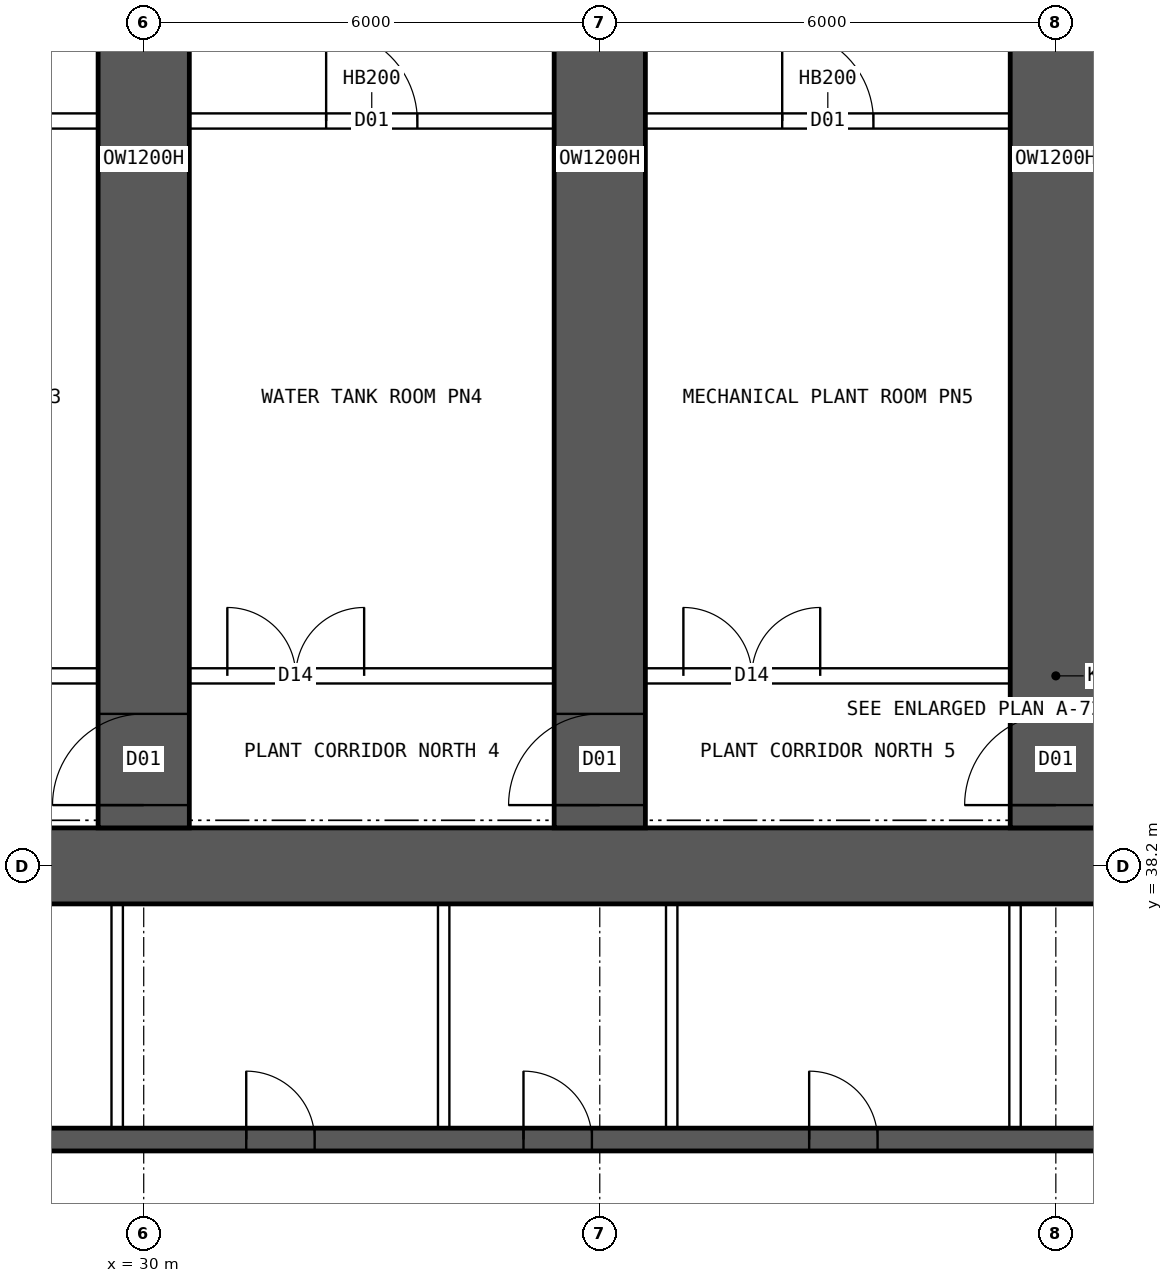
"""IFC4 building model, lengths in metres.
Left out: names, types, materials, properties, quantities, classifications, styles, units other than length and angle.
Written with IfcOpenShell. Run it as: python <this file> out.ifc"""

import sys

from ifc_helpers import new_model, si_unit, direction, frame, frame_2d, origin, place, context, subcontext, project, spatial, rectangle, extrude, element, fill, save


model = new_model("IFC4")
c1 = context("Model", 3, precision=1e-05, world=origin(), true_north=direction((0.0, 1.0)))
c2 = subcontext(c1, "Body", "Model", "MODEL_VIEW")
j1 = project(units=[si_unit("LENGTHUNIT", "METRE"), si_unit("PLANEANGLEUNIT", "RADIAN")], contexts=[c1])
p1 = place(None, origin())
s1 = spatial("IfcSite", under=j1, at=p1, CompositionType="ELEMENT")
p2 = place(p1, origin())
s2 = spatial("IfcBuilding", under=s1, at=p2, CompositionType="ELEMENT")
p3 = place(p2, frame((0.0, 0.0, 68.95)))
s3 = spatial("IfcBuildingStorey", under=s2, at=p3, CompositionType="ELEMENT", Elevation=68.95)
p4 = place(p3, frame((18.0, 38.2, 0.0), z_axis=(0.0, 0.0, 1.0), x_axis=(1.0, 0.0, 0.0)))
e1 = element("IfcWall", 1, at=p4, inside=s3, PredefinedType="SHEAR", context=c2, shape_type="SweptSolid", body=[
    extrude(rectangle(XDim=48.0, YDim=1.0, at=frame_2d((24.0, 0.0))), origin(), (0.0, 0.0, 1.0), 7.2),
])
p5 = place(p3, frame((18.5, 34.6, 0.0), z_axis=(0.0, 0.0, 1.0), x_axis=(1.0, 0.0, 0.0)))
e2 = element("IfcWall", 2, at=p5, inside=s3, PredefinedType="SHEAR", context=c2, shape_type="SweptSolid", body=[
    extrude(rectangle(XDim=47.0, YDim=0.3, at=frame_2d((23.5, 0.0))), origin(), (0.0, 0.0, 1.0), 7.2),
])
p6 = place(p5, frame((0.9, 0.0, 0.0)))
e3 = element("IfcOpeningElement", 3, at=p6, cuts=e2, PredefinedType="OPENING", context=c2, shape_type="SweptSolid", body=[
    extrude(rectangle(XDim=1.1, YDim=2.1, at=frame_2d((0.55, 1.05))), frame((0.0, 0.16, 0.0), z_axis=(0.0, -1.0, 0.0), x_axis=(1.0, 0.0, 0.0)), (0.0, 0.0, 1.0), 0.32),
])
p7 = place(p5, frame((45.0, 0.0, 0.0)))
e4 = element("IfcOpeningElement", 4, at=p7, cuts=e2, PredefinedType="OPENING", context=c2, shape_type="SweptSolid", body=[
    extrude(rectangle(XDim=1.1, YDim=2.1, at=frame_2d((0.55, 1.05))), frame((0.0, 0.16, 0.0), z_axis=(0.0, -1.0, 0.0), x_axis=(1.0, 0.0, 0.0)), (0.0, 0.0, 1.0), 0.32),
])
p8 = place(p5, frame((4.1, 0.0, 0.0)))
e5 = element("IfcOpeningElement", 5, at=p8, cuts=e2, PredefinedType="OPENING", context=c2, shape_type="SweptSolid", body=[
    extrude(rectangle(XDim=0.9, YDim=2.1, at=frame_2d((0.45, 1.05))), frame((0.0, 0.16, 0.0), z_axis=(0.0, -1.0, 0.0), x_axis=(1.0, 0.0, 0.0)), (0.0, 0.0, 1.0), 0.32),
])
p9 = place(p5, frame((42.0, 0.0, 0.0)))
e6 = element("IfcOpeningElement", 6, at=p9, cuts=e2, PredefinedType="OPENING", context=c2, shape_type="SweptSolid", body=[
    extrude(rectangle(XDim=0.9, YDim=2.1, at=frame_2d((0.45, 1.05))), frame((0.0, 0.16, 0.0), z_axis=(0.0, -1.0, 0.0), x_axis=(1.0, 0.0, 0.0)), (0.0, 0.0, 1.0), 0.32),
])
p10 = place(p5, frame((8.875, 0.0, 0.0)))
e7 = element("IfcOpeningElement", 7, at=p10, cuts=e2, PredefinedType="OPENING", context=c2, shape_type="SweptSolid", body=[
    extrude(rectangle(XDim=0.9, YDim=2.1, at=frame_2d((0.45, 1.05))), frame((0.0, 0.16, 0.0), z_axis=(0.0, -1.0, 0.0), x_axis=(1.0, 0.0, 0.0)), (0.0, 0.0, 1.0), 0.32),
])
p11 = place(p5, frame((12.849, 0.0, 0.0)))
e8 = element("IfcOpeningElement", 8, at=p11, cuts=e2, PredefinedType="OPENING", context=c2, shape_type="SweptSolid", body=[
    extrude(rectangle(XDim=0.9, YDim=2.1, at=frame_2d((0.45, 1.05))), frame((0.0, 0.16, 0.0), z_axis=(0.0, -1.0, 0.0), x_axis=(1.0, 0.0, 0.0)), (0.0, 0.0, 1.0), 0.32),
])
p12 = place(p5, frame((16.496, 0.0, 0.0)))
e9 = element("IfcOpeningElement", 9, at=p12, cuts=e2, PredefinedType="OPENING", context=c2, shape_type="SweptSolid", body=[
    extrude(rectangle(XDim=0.9, YDim=2.1, at=frame_2d((0.45, 1.05))), frame((0.0, 0.16, 0.0), z_axis=(0.0, -1.0, 0.0), x_axis=(1.0, 0.0, 0.0)), (0.0, 0.0, 1.0), 0.32),
])
p13 = place(p5, frame((20.255, 0.0, 0.0)))
e10 = element("IfcOpeningElement", 10, at=p13, cuts=e2, PredefinedType="OPENING", context=c2, shape_type="SweptSolid", body=[
    extrude(rectangle(XDim=0.9, YDim=2.1, at=frame_2d((0.45, 1.05))), frame((0.0, 0.16, 0.0), z_axis=(0.0, -1.0, 0.0), x_axis=(1.0, 0.0, 0.0)), (0.0, 0.0, 1.0), 0.32),
])
p14 = place(p5, frame((24.661, 0.0, 0.0)))
e11 = element("IfcOpeningElement", 11, at=p14, cuts=e2, PredefinedType="OPENING", context=c2, shape_type="SweptSolid", body=[
    extrude(rectangle(XDim=0.9, YDim=2.1, at=frame_2d((0.45, 1.05))), frame((0.0, 0.16, 0.0), z_axis=(0.0, -1.0, 0.0), x_axis=(1.0, 0.0, 0.0)), (0.0, 0.0, 1.0), 0.32),
])
p15 = place(p5, frame((27.458, 0.0, 0.0)))
e12 = element("IfcOpeningElement", 12, at=p15, cuts=e2, PredefinedType="OPENING", context=c2, shape_type="SweptSolid", body=[
    extrude(rectangle(XDim=0.9, YDim=2.1, at=frame_2d((0.45, 1.05))), frame((0.0, 0.16, 0.0), z_axis=(0.0, -1.0, 0.0), x_axis=(1.0, 0.0, 0.0)), (0.0, 0.0, 1.0), 0.32),
])
p16 = place(p5, frame((29.831, 0.0, 0.0)))
e13 = element("IfcOpeningElement", 13, at=p16, cuts=e2, PredefinedType="OPENING", context=c2, shape_type="SweptSolid", body=[
    extrude(rectangle(XDim=0.9, YDim=2.1, at=frame_2d((0.45, 1.05))), frame((0.0, 0.16, 0.0), z_axis=(0.0, -1.0, 0.0), x_axis=(1.0, 0.0, 0.0)), (0.0, 0.0, 1.0), 0.32),
])
p17 = place(p5, frame((33.68, 0.0, 0.0)))
e14 = element("IfcOpeningElement", 14, at=p17, cuts=e2, PredefinedType="OPENING", context=c2, shape_type="SweptSolid", body=[
    extrude(rectangle(XDim=0.9, YDim=2.1, at=frame_2d((0.45, 1.05))), frame((0.0, 0.16, 0.0), z_axis=(0.0, -1.0, 0.0), x_axis=(1.0, 0.0, 0.0)), (0.0, 0.0, 1.0), 0.32),
])
p18 = place(p5, frame((37.429, 0.0, 0.0)))
e15 = element("IfcOpeningElement", 15, at=p18, cuts=e2, PredefinedType="OPENING", context=c2, shape_type="SweptSolid", body=[
    extrude(rectangle(XDim=0.9, YDim=2.1, at=frame_2d((0.45, 1.05))), frame((0.0, 0.16, 0.0), z_axis=(0.0, -1.0, 0.0), x_axis=(1.0, 0.0, 0.0)), (0.0, 0.0, 1.0), 0.32),
])
p19 = place(p3, frame((30.0, 38.7, 0.0), z_axis=(0.0, 0.0, 1.0), x_axis=(0.0, 1.0, 0.0)))
e16 = element("IfcWall", 16, at=p19, inside=s3, PredefinedType="SHEAR", context=c2, shape_type="SweptSolid", body=[
    extrude(rectangle(XDim=17.6, YDim=1.2, at=frame_2d((8.8, 0.0))), origin(), (0.0, 0.0, 1.0), 7.2),
])
p20 = place(p19, frame((0.3, 0.0, 0.0)))
e17 = element("IfcOpeningElement", 17, at=p20, cuts=e16, PredefinedType="OPENING", context=c2, shape_type="SweptSolid", body=[
    extrude(rectangle(XDim=1.2, YDim=2.1, at=frame_2d((0.6, 1.05))), frame((0.0, 0.61, 0.0), z_axis=(0.0, -1.0, 0.0), x_axis=(1.0, 0.0, 0.0)), (0.0, 0.0, 1.0), 1.22),
])
p21 = place(p3, frame((36.0, 38.7, 0.0), z_axis=(0.0, 0.0, 1.0), x_axis=(0.0, 1.0, 0.0)))
e18 = element("IfcWall", 18, at=p21, inside=s3, PredefinedType="SHEAR", context=c2, shape_type="SweptSolid", body=[
    extrude(rectangle(XDim=17.6, YDim=1.2, at=frame_2d((8.8, 0.0))), origin(), (0.0, 0.0, 1.0), 7.2),
])
p22 = place(p21, frame((0.3, 0.0, 0.0)))
e19 = element("IfcOpeningElement", 19, at=p22, cuts=e18, PredefinedType="OPENING", context=c2, shape_type="SweptSolid", body=[
    extrude(rectangle(XDim=1.2, YDim=2.1, at=frame_2d((0.6, 1.05))), frame((0.0, 0.61, 0.0), z_axis=(0.0, -1.0, 0.0), x_axis=(1.0, 0.0, 0.0)), (0.0, 0.0, 1.0), 1.22),
])
p23 = place(p3, frame((42.0, 38.7, 0.0), z_axis=(0.0, 0.0, 1.0), x_axis=(0.0, 1.0, 0.0)))
e20 = element("IfcWall", 20, at=p23, inside=s3, PredefinedType="SHEAR", context=c2, shape_type="SweptSolid", body=[
    extrude(rectangle(XDim=17.6, YDim=1.2, at=frame_2d((8.8, 0.0))), origin(), (0.0, 0.0, 1.0), 7.2),
])
p24 = place(p23, frame((0.3, 0.0, 0.0)))
e21 = element("IfcOpeningElement", 21, at=p24, cuts=e20, PredefinedType="OPENING", context=c2, shape_type="SweptSolid", body=[
    extrude(rectangle(XDim=1.2, YDim=2.1, at=frame_2d((0.6, 1.05))), frame((0.0, 0.61, 0.0), z_axis=(0.0, -1.0, 0.0), x_axis=(1.0, 0.0, 0.0)), (0.0, 0.0, 1.0), 1.22),
])
for number, where, z_axis, x_axis in (
    (22, (29.651, 34.75, 0.0), (0.0, 0.0, 1.0), (0.0, 1.0, 0.0)),
    (23, (33.946, 34.75, 0.0), (0.0, 0.0, 1.0), (0.0, 1.0, 0.0)),
    (24, (36.946, 34.75, 0.0), (0.0, 0.0, 1.0), (0.0, 1.0, 0.0)),
    (25, (41.463, 34.75, 0.0), (0.0, 0.0, 1.0), (0.0, 1.0, 0.0)),
):
    element("IfcWall", number, at=place(p3, frame(where, z_axis=z_axis, x_axis=x_axis)), inside=s3, PredefinedType="SOLIDWALL", context=c2, shape_type="SweptSolid", body=[
        extrude(rectangle(XDim=2.95, YDim=0.15, at=frame_2d((1.475, 0.0))), origin(), (0.0, 0.0, 1.0), 6.9),
    ])
p25 = place(p3, frame((15.6, 40.7, 0.0), z_axis=(0.0, 0.0, 1.0), x_axis=(1.0, 0.0, 0.0)))
e26 = element("IfcWall", 26, at=p25, inside=s3, PredefinedType="SOLIDWALL", context=c2, shape_type="SweptSolid", body=[
    extrude(rectangle(XDim=52.8, YDim=0.2, at=frame_2d((26.4, 0.0))), origin(), (0.0, 0.0, 1.0), 6.9),
])
p26 = place(p25, frame((0.6, 0.0, 0.0)))
e27 = element("IfcOpeningElement", 27, at=p26, cuts=e26, PredefinedType="OPENING", context=c2, shape_type="SweptSolid", body=[
    extrude(rectangle(XDim=1.2, YDim=2.1, at=frame_2d((0.6, 1.05))), frame((0.0, 0.11, 0.0), z_axis=(0.0, -1.0, 0.0), x_axis=(1.0, 0.0, 0.0)), (0.0, 0.0, 1.0), 0.22),
])
p27 = place(p25, frame((3.5, 0.0, 0.0)))
e28 = element("IfcOpeningElement", 28, at=p27, cuts=e26, PredefinedType="OPENING", context=c2, shape_type="SweptSolid", body=[
    extrude(rectangle(XDim=1.8, YDim=2.4, at=frame_2d((0.9, 1.2))), frame((0.0, 0.11, 0.0), z_axis=(0.0, -1.0, 0.0), x_axis=(1.0, 0.0, 0.0)), (0.0, 0.0, 1.0), 0.22),
])
p28 = place(p25, frame((9.5, 0.0, 0.0)))
e29 = element("IfcOpeningElement", 29, at=p28, cuts=e26, PredefinedType="OPENING", context=c2, shape_type="SweptSolid", body=[
    extrude(rectangle(XDim=1.8, YDim=2.4, at=frame_2d((0.9, 1.2))), frame((0.0, 0.11, 0.0), z_axis=(0.0, -1.0, 0.0), x_axis=(1.0, 0.0, 0.0)), (0.0, 0.0, 1.0), 0.22),
])
p29 = place(p25, frame((15.5, 0.0, 0.0)))
e30 = element("IfcOpeningElement", 30, at=p29, cuts=e26, PredefinedType="OPENING", context=c2, shape_type="SweptSolid", body=[
    extrude(rectangle(XDim=1.8, YDim=2.4, at=frame_2d((0.9, 1.2))), frame((0.0, 0.11, 0.0), z_axis=(0.0, -1.0, 0.0), x_axis=(1.0, 0.0, 0.0)), (0.0, 0.0, 1.0), 0.22),
])
p30 = place(p25, frame((21.5, 0.0, 0.0)))
e31 = element("IfcOpeningElement", 31, at=p30, cuts=e26, PredefinedType="OPENING", context=c2, shape_type="SweptSolid", body=[
    extrude(rectangle(XDim=1.8, YDim=2.4, at=frame_2d((0.9, 1.2))), frame((0.0, 0.11, 0.0), z_axis=(0.0, -1.0, 0.0), x_axis=(1.0, 0.0, 0.0)), (0.0, 0.0, 1.0), 0.22),
])
p31 = place(p25, frame((27.5, 0.0, 0.0)))
e32 = element("IfcOpeningElement", 32, at=p31, cuts=e26, PredefinedType="OPENING", context=c2, shape_type="SweptSolid", body=[
    extrude(rectangle(XDim=1.8, YDim=2.4, at=frame_2d((0.9, 1.2))), frame((0.0, 0.11, 0.0), z_axis=(0.0, -1.0, 0.0), x_axis=(1.0, 0.0, 0.0)), (0.0, 0.0, 1.0), 0.22),
])
p32 = place(p25, frame((33.5, 0.0, 0.0)))
e33 = element("IfcOpeningElement", 33, at=p32, cuts=e26, PredefinedType="OPENING", context=c2, shape_type="SweptSolid", body=[
    extrude(rectangle(XDim=1.8, YDim=2.4, at=frame_2d((0.9, 1.2))), frame((0.0, 0.11, 0.0), z_axis=(0.0, -1.0, 0.0), x_axis=(1.0, 0.0, 0.0)), (0.0, 0.0, 1.0), 0.22),
])
p33 = place(p25, frame((39.5, 0.0, 0.0)))
e34 = element("IfcOpeningElement", 34, at=p33, cuts=e26, PredefinedType="OPENING", context=c2, shape_type="SweptSolid", body=[
    extrude(rectangle(XDim=1.8, YDim=2.4, at=frame_2d((0.9, 1.2))), frame((0.0, 0.11, 0.0), z_axis=(0.0, -1.0, 0.0), x_axis=(1.0, 0.0, 0.0)), (0.0, 0.0, 1.0), 0.22),
])
p34 = place(p25, frame((45.5, 0.0, 0.0)))
e35 = element("IfcOpeningElement", 35, at=p34, cuts=e26, PredefinedType="OPENING", context=c2, shape_type="SweptSolid", body=[
    extrude(rectangle(XDim=1.8, YDim=2.4, at=frame_2d((0.9, 1.2))), frame((0.0, 0.11, 0.0), z_axis=(0.0, -1.0, 0.0), x_axis=(1.0, 0.0, 0.0)), (0.0, 0.0, 1.0), 0.22),
])
p35 = place(p25, frame((51.5, 0.0, 0.0)))
e36 = element("IfcOpeningElement", 36, at=p35, cuts=e26, PredefinedType="OPENING", context=c2, shape_type="SweptSolid", body=[
    extrude(rectangle(XDim=1.2, YDim=2.1, at=frame_2d((0.6, 1.05))), frame((0.0, 0.11, 0.0), z_axis=(0.0, -1.0, 0.0), x_axis=(1.0, 0.0, 0.0)), (0.0, 0.0, 1.0), 0.22),
])
p36 = place(p3, frame((24.5, 48.0, 0.0), z_axis=(0.0, 0.0, 1.0), x_axis=(1.0, 0.0, 0.0)))
e37 = element("IfcWall", 37, at=p36, inside=s3, PredefinedType="SOLIDWALL", context=c2, shape_type="SweptSolid", body=[
    extrude(rectangle(XDim=5.0, YDim=0.2, at=frame_2d((2.5, 0.0))), origin(), (0.0, 0.0, 1.0), 6.9),
])
p37 = place(p36, frame((1.9, 0.0, 0.0)))
e38 = element("IfcOpeningElement", 38, at=p37, cuts=e37, PredefinedType="OPENING", context=c2, shape_type="SweptSolid", body=[
    extrude(rectangle(XDim=1.2, YDim=2.1, at=frame_2d((0.6, 1.05))), frame((0.0, 0.11, 0.0), z_axis=(0.0, -1.0, 0.0), x_axis=(1.0, 0.0, 0.0)), (0.0, 0.0, 1.0), 0.22),
])
p38 = place(p3, frame((30.5, 48.0, 0.0), z_axis=(0.0, 0.0, 1.0), x_axis=(1.0, 0.0, 0.0)))
e39 = element("IfcWall", 39, at=p38, inside=s3, PredefinedType="SOLIDWALL", context=c2, shape_type="SweptSolid", body=[
    extrude(rectangle(XDim=5.0, YDim=0.2, at=frame_2d((2.5, 0.0))), origin(), (0.0, 0.0, 1.0), 6.9),
])
p39 = place(p38, frame((1.9, 0.0, 0.0)))
e40 = element("IfcOpeningElement", 40, at=p39, cuts=e39, PredefinedType="OPENING", context=c2, shape_type="SweptSolid", body=[
    extrude(rectangle(XDim=1.2, YDim=2.1, at=frame_2d((0.6, 1.05))), frame((0.0, 0.11, 0.0), z_axis=(0.0, -1.0, 0.0), x_axis=(1.0, 0.0, 0.0)), (0.0, 0.0, 1.0), 0.22),
])
p40 = place(p3, frame((36.5, 48.0, 0.0), z_axis=(0.0, 0.0, 1.0), x_axis=(1.0, 0.0, 0.0)))
e41 = element("IfcWall", 41, at=p40, inside=s3, PredefinedType="SOLIDWALL", context=c2, shape_type="SweptSolid", body=[
    extrude(rectangle(XDim=5.0, YDim=0.2, at=frame_2d((2.5, 0.0))), origin(), (0.0, 0.0, 1.0), 6.9),
])
p41 = place(p40, frame((1.9, 0.0, 0.0)))
e42 = element("IfcOpeningElement", 42, at=p41, cuts=e41, PredefinedType="OPENING", context=c2, shape_type="SweptSolid", body=[
    extrude(rectangle(XDim=1.2, YDim=2.1, at=frame_2d((0.6, 1.05))), frame((0.0, 0.11, 0.0), z_axis=(0.0, -1.0, 0.0), x_axis=(1.0, 0.0, 0.0)), (0.0, 0.0, 1.0), 0.22),
])
p42 = place(p11, origin())
e43 = element("IfcDoor", 43, at=p42, inside=s3, OperationType="SINGLE_SWING_LEFT", PredefinedType="DOOR", context=c2, shape_type="SweptSolid", body=[
    extrude(rectangle(XDim=0.9, YDim=2.1, at=frame_2d((0.45, 1.05))), frame((0.0, 0.025, 0.0), z_axis=(0.0, -1.0, 0.0), x_axis=(1.0, 0.0, 0.0)), (0.0, 0.0, 1.0), 0.05),
])
fill(e8, e43)
p43 = place(p12, origin())
e44 = element("IfcDoor", 44, at=p43, inside=s3, OperationType="SINGLE_SWING_LEFT", PredefinedType="DOOR", context=c2, shape_type="SweptSolid", body=[
    extrude(rectangle(XDim=0.9, YDim=2.1, at=frame_2d((0.45, 1.05))), frame((0.0, 0.025, 0.0), z_axis=(0.0, -1.0, 0.0), x_axis=(1.0, 0.0, 0.0)), (0.0, 0.0, 1.0), 0.05),
])
fill(e9, e44)
p44 = place(p13, origin())
e45 = element("IfcDoor", 45, at=p44, inside=s3, OperationType="SINGLE_SWING_LEFT", PredefinedType="DOOR", context=c2, shape_type="SweptSolid", body=[
    extrude(rectangle(XDim=0.9, YDim=2.1, at=frame_2d((0.45, 1.05))), frame((0.0, 0.025, 0.0), z_axis=(0.0, -1.0, 0.0), x_axis=(1.0, 0.0, 0.0)), (0.0, 0.0, 1.0), 0.05),
])
fill(e10, e45)
p45 = place(p39, origin())
e46 = element("IfcDoor", 46, at=p45, inside=s3, OperationType="SINGLE_SWING_LEFT", PredefinedType="DOOR", context=c2, shape_type="SweptSolid", body=[
    extrude(rectangle(XDim=1.2, YDim=2.1, at=frame_2d((0.6, 1.05))), frame((0.0, 0.025, 0.0), z_axis=(0.0, -1.0, 0.0), x_axis=(1.0, 0.0, 0.0)), (0.0, 0.0, 1.0), 0.05),
])
fill(e40, e46)
p46 = place(p41, origin())
e47 = element("IfcDoor", 47, at=p46, inside=s3, OperationType="SINGLE_SWING_LEFT", PredefinedType="DOOR", context=c2, shape_type="SweptSolid", body=[
    extrude(rectangle(XDim=1.2, YDim=2.1, at=frame_2d((0.6, 1.05))), frame((0.0, 0.025, 0.0), z_axis=(0.0, -1.0, 0.0), x_axis=(1.0, 0.0, 0.0)), (0.0, 0.0, 1.0), 0.05),
])
fill(e42, e47)
p47 = place(p29, origin())
e48 = element("IfcDoor", 48, at=p47, inside=s3, OperationType="DOUBLE_DOOR_SINGLE_SWING", PredefinedType="DOOR", context=c2, shape_type="SweptSolid", body=[
    extrude(rectangle(XDim=1.8, YDim=2.4, at=frame_2d((0.9, 1.2))), frame((0.0, 0.025, 0.0), z_axis=(0.0, -1.0, 0.0), x_axis=(1.0, 0.0, 0.0)), (0.0, 0.0, 1.0), 0.05),
])
fill(e30, e48)
p48 = place(p30, origin())
e49 = element("IfcDoor", 49, at=p48, inside=s3, OperationType="DOUBLE_DOOR_SINGLE_SWING", PredefinedType="DOOR", context=c2, shape_type="SweptSolid", body=[
    extrude(rectangle(XDim=1.8, YDim=2.4, at=frame_2d((0.9, 1.2))), frame((0.0, 0.025, 0.0), z_axis=(0.0, -1.0, 0.0), x_axis=(1.0, 0.0, 0.0)), (0.0, 0.0, 1.0), 0.05),
])
fill(e31, e49)
p49 = place(p20, origin())
e50 = element("IfcDoor", 50, at=p49, inside=s3, OperationType="SINGLE_SWING_LEFT", PredefinedType="DOOR", context=c2, shape_type="SweptSolid", body=[
    extrude(rectangle(XDim=1.2, YDim=2.1, at=frame_2d((0.6, 1.05))), frame((0.0, 0.025, 0.0), z_axis=(0.0, -1.0, 0.0), x_axis=(1.0, 0.0, 0.0)), (0.0, 0.0, 1.0), 0.05),
])
fill(e17, e50)
p50 = place(p22, origin())
e51 = element("IfcDoor", 51, at=p50, inside=s3, OperationType="SINGLE_SWING_LEFT", PredefinedType="DOOR", context=c2, shape_type="SweptSolid", body=[
    extrude(rectangle(XDim=1.2, YDim=2.1, at=frame_2d((0.6, 1.05))), frame((0.0, 0.025, 0.0), z_axis=(0.0, -1.0, 0.0), x_axis=(1.0, 0.0, 0.0)), (0.0, 0.0, 1.0), 0.05),
])
fill(e19, e51)
p51 = place(p24, origin())
e52 = element("IfcDoor", 52, at=p51, inside=s3, OperationType="SINGLE_SWING_LEFT", PredefinedType="DOOR", context=c2, shape_type="SweptSolid", body=[
    extrude(rectangle(XDim=1.2, YDim=2.1, at=frame_2d((0.6, 1.05))), frame((0.0, 0.025, 0.0), z_axis=(0.0, -1.0, 0.0), x_axis=(1.0, 0.0, 0.0)), (0.0, 0.0, 1.0), 0.05),
])
fill(e21, e52)
save(model, sys.argv[1])
